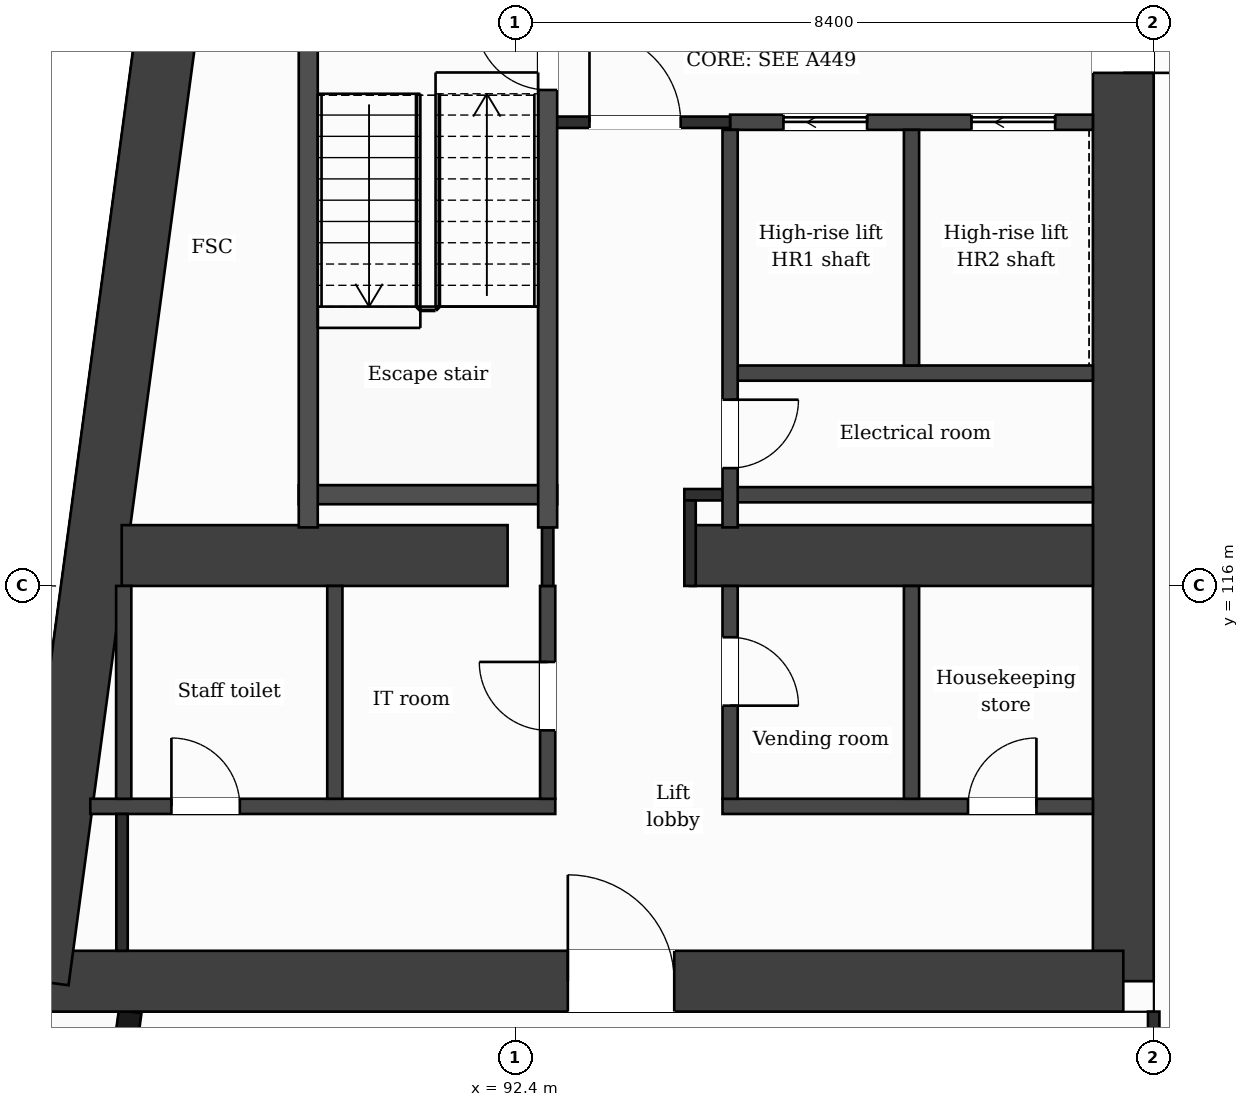
"""IFC4 building model, lengths in metres.
Left out: names, types, materials, properties, quantities, classifications, styles, units other than length and angle.
Written with IfcOpenShell. Run it as: python <this file> out.ifc"""

import sys

from ifc_helpers import new_model, si_unit, direction, frame, frame_2d, origin, place, context, subcontext, project, spatial, rectangle, extrude, element, fill, save


model = new_model("IFC4")
c1 = context("Model", 3, precision=1e-05, world=origin(), true_north=direction((0.0, 1.0)))
c2 = subcontext(c1, "Body", "Model", "MODEL_VIEW")
j1 = project(units=[si_unit("LENGTHUNIT", "METRE"), si_unit("PLANEANGLEUNIT", "RADIAN")], contexts=[c1])
p1 = place(None, origin())
s1 = spatial("IfcSite", under=j1, at=p1, CompositionType="ELEMENT")
p2 = place(p1, origin())
s2 = spatial("IfcBuilding", under=s1, at=p2, CompositionType="ELEMENT")
p3 = place(p2, frame((0.0, 0.0, 202.2)))
s3 = spatial("IfcBuildingStorey", under=s2, at=p3, CompositionType="ELEMENT", Elevation=202.2)
p4 = place(p3, frame((100.4, 132.0, 0.0), z_axis=(0.0, 0.0, 1.0), x_axis=(0.0, -1.0, 0.0)))
e1 = element("IfcWall", 1, at=p4, inside=s3, PredefinedType="SHEAR", context=c2, shape_type="SweptSolid", body=[
    extrude(rectangle(XDim=21.2, YDim=0.8, at=frame_2d((10.6, 0.0))), origin(), (0.0, 0.0, 1.0), 3.7),
])
p5 = place(p4, frame((7.85, 0.0, 0.0)))
e2 = element("IfcOpeningElement", 2, at=p5, cuts=e1, PredefinedType="OPENING", context=c2, shape_type="SweptSolid", body=[
    extrude(rectangle(XDim=1.4, YDim=2.1, at=frame_2d((0.7, 1.05))), frame((0.0, 0.41, 0.0), z_axis=(0.0, -1.0, 0.0), x_axis=(1.0, 0.0, 0.0)), (0.0, 0.0, 1.0), 0.82),
])
p6 = place(p3, frame((100.4, 110.8, 0.0), z_axis=(0.0, 0.0, 1.0), x_axis=(-1.0, 0.0, 0.0)))
e3 = element("IfcWall", 3, at=p6, inside=s3, PredefinedType="SHEAR", context=c2, shape_type="SweptSolid", body=[
    extrude(rectangle(XDim=14.273, YDim=0.8, at=frame_2d((7.137, 0.0))), origin(), (0.0, 0.0, 1.0), 3.7),
])
p7 = place(p6, frame((5.908, 0.0, 0.0)))
e4 = element("IfcOpeningElement", 4, at=p7, cuts=e3, PredefinedType="OPENING", context=c2, shape_type="SweptSolid", body=[
    extrude(rectangle(XDim=1.4, YDim=2.1, at=frame_2d((0.7, 1.05))), frame((0.0, 0.41, 0.0), z_axis=(0.0, -1.0, 0.0), x_axis=(1.0, 0.0, 0.0)), (0.0, 0.0, 1.0), 0.82),
])
p8 = place(p3, frame((86.127, 110.8, 0.0), z_axis=(0.0, 0.0, 1.0), x_axis=(0.133408347329, 0.991061154956, 0.0)))
e5 = element("IfcWall", 5, at=p8, inside=s3, PredefinedType="SHEAR", context=c2, shape_type="SweptSolid", body=[
    extrude(rectangle(XDim=21.391, YDim=0.8, at=frame_2d((10.696, 0.0))), origin(), (0.0, 0.0, 1.0), 3.7),
])
p9 = place(p3, frame((87.223, 116.4, 0.0), z_axis=(0.0, 0.0, 1.0), x_axis=(1.0, 0.0, 0.0)))
e6 = element("IfcWall", 6, at=p9, inside=s3, PredefinedType="SHEAR", context=c2, shape_type="SweptSolid", body=[
    extrude(rectangle(XDim=5.077, YDim=0.8, at=frame_2d((2.539, 0.0))), origin(), (0.0, 0.0, 1.0), 3.7),
])
p10 = place(p3, frame((94.7, 116.4, 0.0), z_axis=(0.0, 0.0, 1.0), x_axis=(1.0, 0.0, 0.0)))
e7 = element("IfcWall", 7, at=p10, inside=s3, PredefinedType="SHEAR", context=c2, shape_type="SweptSolid", body=[
    extrude(rectangle(XDim=5.3, YDim=0.8, at=frame_2d((2.65, 0.0))), origin(), (0.0, 0.0, 1.0), 3.7),
])
p11 = place(p3, frame((87.334, 110.4, 0.0), z_axis=(0.0, 0.0, 1.0), x_axis=(-0.133437175554, -0.991057273915, 0.0)))
e8 = element("IfcWall", 8, at=p11, inside=s3, PredefinedType="SOLIDWALL", context=c2, shape_type="SweptSolid", body=[
    extrude(rectangle(XDim=6.781, YDim=0.3, at=frame_2d((3.39, 0.0))), origin(), (0.0, 0.0, 1.0), 3.38),
])
p12 = place(p11, frame((1.418, 0.0, 0.0)))
e9 = element("IfcOpeningElement", 9, at=p12, cuts=e8, PredefinedType="OPENING", context=c2, shape_type="SweptSolid", body=[
    extrude(rectangle(XDim=1.2, YDim=2.4, at=frame_2d((0.6, 1.2))), frame((0.0, 0.16, 0.0), z_axis=(0.0, -1.0, 0.0), x_axis=(1.0, 0.0, 0.0)), (0.0, 0.0, 1.0), 0.32),
])
p13 = place(p11, frame((4.758, 0.0, 0.9)))
e10 = element("IfcOpeningElement", 10, at=p13, cuts=e8, PredefinedType="OPENING", context=c2, shape_type="SweptSolid", body=[
    extrude(rectangle(XDim=1.2, YDim=2.1, at=frame_2d((0.6, 1.05))), frame((0.0, 0.16, 0.0), z_axis=(0.0, -1.0, 0.0), x_axis=(1.0, 0.0, 0.0)), (0.0, 0.0, 1.0), 0.32),
])
p14 = place(p3, frame((86.81, 113.1, 0.0), z_axis=(0.0, 0.0, 1.0), x_axis=(1.0, 0.0, 0.0)))
e11 = element("IfcWall", 11, at=p14, inside=s3, PredefinedType="PARTITIONING", context=c2, shape_type="SweptSolid", body=[
    extrude(rectangle(XDim=6.117, YDim=0.2, at=frame_2d((3.059, 0.0))), origin(), (0.0, 0.0, 1.0), 3.38),
])
p15 = place(p14, frame((1.067, 0.0, 0.0)))
e12 = element("IfcOpeningElement", 12, at=p15, cuts=e11, PredefinedType="OPENING", context=c2, shape_type="SweptSolid", body=[
    extrude(rectangle(XDim=0.9, YDim=2.1, at=frame_2d((0.45, 1.05))), frame((0.0, 0.11, 0.0), z_axis=(0.0, -1.0, 0.0), x_axis=(1.0, 0.0, 0.0)), (0.0, 0.0, 1.0), 0.22),
])
p16 = place(p3, frame((95.127, 113.1, 0.0), z_axis=(0.0, 0.0, 1.0), x_axis=(1.0, 0.0, 0.0)))
e13 = element("IfcWall", 13, at=p16, inside=s3, PredefinedType="PARTITIONING", context=c2, shape_type="SweptSolid", body=[
    extrude(rectangle(XDim=4.873, YDim=0.2, at=frame_2d((2.437, 0.0))), origin(), (0.0, 0.0, 1.0), 3.38),
])
p17 = place(p16, frame((3.23, 0.0, 0.0)))
e14 = element("IfcOpeningElement", 14, at=p17, cuts=e13, PredefinedType="OPENING", context=c2, shape_type="SweptSolid", body=[
    extrude(rectangle(XDim=0.9, YDim=2.1, at=frame_2d((0.45, 1.05))), frame((0.0, 0.11, 0.0), z_axis=(0.0, -1.0, 0.0), x_axis=(1.0, 0.0, 0.0)), (0.0, 0.0, 1.0), 0.22),
])
p18 = place(p3, frame((95.227, 117.2, 0.0), z_axis=(0.0, 0.0, 1.0), x_axis=(1.0, 0.0, 0.0)))
e15 = element("IfcWall", 15, at=p18, inside=s3, PredefinedType="PARTITIONING", context=c2, shape_type="SweptSolid", body=[
    extrude(rectangle(XDim=4.773, YDim=0.2, at=frame_2d((2.386, 0.0))), origin(), (0.0, 0.0, 1.0), 3.38),
])
p19 = place(p3, frame((94.625, 117.2, 0.0), z_axis=(0.0, 0.0, 1.0), x_axis=(1.0, 0.0, 0.0)))
e16 = element("IfcWall", 16, at=p19, inside=s3, PredefinedType="PARTITIONING", context=c2, shape_type="SweptSolid", body=[
    extrude(rectangle(XDim=0.602, YDim=0.15, at=frame_2d((0.301, 0.0))), origin(), (0.0, 0.0, 1.0), 3.38),
])
p20 = place(p3, frame((89.552, 117.2, 0.0), z_axis=(0.0, 0.0, 1.0), x_axis=(1.0, 0.0, 0.0)))
e17 = element("IfcWall", 17, at=p20, inside=s3, PredefinedType="PARTITIONING", context=c2, shape_type="SweptSolid", body=[
    extrude(rectangle(XDim=3.4, YDim=0.25, at=frame_2d((1.7, 0.0))), origin(), (0.0, 0.0, 1.0), 3.38),
])
p21 = place(p3, frame((95.227, 118.8, 0.0), z_axis=(0.0, 0.0, 1.0), x_axis=(1.0, 0.0, 0.0)))
e18 = element("IfcWall", 18, at=p21, inside=s3, PredefinedType="PARTITIONING", context=c2, shape_type="SweptSolid", body=[
    extrude(rectangle(XDim=4.773, YDim=0.2, at=frame_2d((2.386, 0.0))), origin(), (0.0, 0.0, 1.0), 3.38),
])
p22 = place(p3, frame((95.227, 122.1, 0.0), z_axis=(0.0, 0.0, 1.0), x_axis=(1.0, 0.0, 0.0)))
e19 = element("IfcWall", 19, at=p22, inside=s3, PredefinedType="PARTITIONING", context=c2, shape_type="SweptSolid", body=[
    extrude(rectangle(XDim=4.773, YDim=0.2, at=frame_2d((2.386, 0.0))), origin(), (0.0, 0.0, 1.0), 3.38),
])
p23 = place(p22, frame((0.702, 0.0, 0.0)))
e20 = element("IfcOpeningElement", 20, at=p23, cuts=e19, PredefinedType="OPENING", context=c2, shape_type="SweptSolid", body=[
    extrude(rectangle(XDim=1.1, YDim=2.1, at=frame_2d((0.55, 1.05))), frame((0.0, 0.11, 0.0), z_axis=(0.0, -1.0, 0.0), x_axis=(1.0, 0.0, 0.0)), (0.0, 0.0, 1.0), 0.22),
])
p24 = place(p22, frame((3.176, 0.0, 0.0)))
e21 = element("IfcOpeningElement", 21, at=p24, cuts=e19, PredefinedType="OPENING", context=c2, shape_type="SweptSolid", body=[
    extrude(rectangle(XDim=1.1, YDim=2.1, at=frame_2d((0.55, 1.05))), frame((0.0, 0.11, 0.0), z_axis=(0.0, -1.0, 0.0), x_axis=(1.0, 0.0, 0.0)), (0.0, 0.0, 1.0), 0.22),
])
p25 = place(p3, frame((92.827, 122.1, 0.0), z_axis=(0.0, 0.0, 1.0), x_axis=(1.0, 0.0, 0.0)))
e22 = element("IfcWall", 22, at=p25, inside=s3, PredefinedType="PARTITIONING", context=c2, shape_type="SweptSolid", body=[
    extrude(rectangle(XDim=2.4, YDim=0.15, at=frame_2d((1.2, 0.0))), origin(), (0.0, 0.0, 1.0), 3.38),
])
p26 = place(p25, frame((0.55, 0.0, 0.0)))
e23 = element("IfcOpeningElement", 23, at=p26, cuts=e22, PredefinedType="OPENING", context=c2, shape_type="SweptSolid", body=[
    extrude(rectangle(XDim=1.2, YDim=2.1, at=frame_2d((0.6, 1.05))), frame((0.0, 0.085, 0.0), z_axis=(0.0, -1.0, 0.0), x_axis=(1.0, 0.0, 0.0)), (0.0, 0.0, 1.0), 0.17),
])
p27 = place(p3, frame((87.25, 113.2, 0.0), z_axis=(0.0, 0.0, 1.0), x_axis=(0.0, 1.0, 0.0)))
e24 = element("IfcWall", 24, at=p27, inside=s3, PredefinedType="PARTITIONING", context=c2, shape_type="SweptSolid", body=[
    extrude(rectangle(XDim=2.8, YDim=0.2, at=frame_2d((1.4, 0.0))), origin(), (0.0, 0.0, 1.0), 3.38),
])
p28 = place(p3, frame((87.227, 111.2, 0.0), z_axis=(0.0, 0.0, 1.0), x_axis=(0.0, 1.0, 0.0)))
e25 = element("IfcWall", 25, at=p28, inside=s3, PredefinedType="PARTITIONING", context=c2, shape_type="SweptSolid", body=[
    extrude(rectangle(XDim=1.8, YDim=0.15, at=frame_2d((0.9, 0.0))), origin(), (0.0, 0.0, 1.0), 3.38),
])
p29 = place(p3, frame((89.677, 116.77, 0.0), z_axis=(0.0, 0.0, 1.0), x_axis=(0.0, 1.0, 0.0)))
e26 = element("IfcWall", 26, at=p29, inside=s3, PredefinedType="PARTITIONING", context=c2, shape_type="SweptSolid", body=[
    extrude(rectangle(XDim=7.055, YDim=0.25, at=frame_2d((3.527, 0.0))), origin(), (0.0, 0.0, 1.0), 3.38),
])
p30 = place(p3, frame((90.027, 113.2, 0.0), z_axis=(0.0, 0.0, 1.0), x_axis=(0.0, 1.0, 0.0)))
e27 = element("IfcWall", 27, at=p30, inside=s3, PredefinedType="PARTITIONING", context=c2, shape_type="SweptSolid", body=[
    extrude(rectangle(XDim=2.8, YDim=0.2, at=frame_2d((1.4, 0.0))), origin(), (0.0, 0.0, 1.0), 3.38),
])
p31 = place(p3, frame((92.827, 113.2, 0.0), z_axis=(0.0, 0.0, 1.0), x_axis=(0.0, 1.0, 0.0)))
e28 = element("IfcWall", 28, at=p31, inside=s3, PredefinedType="PARTITIONING", context=c2, shape_type="SweptSolid", body=[
    extrude(rectangle(XDim=2.8, YDim=0.2, at=frame_2d((1.4, 0.0))), origin(), (0.0, 0.0, 1.0), 3.38),
])
p32 = place(p31, frame((0.9, 0.0, 0.0)))
e29 = element("IfcOpeningElement", 29, at=p32, cuts=e28, PredefinedType="OPENING", context=c2, shape_type="SweptSolid", body=[
    extrude(rectangle(XDim=0.9, YDim=2.1, at=frame_2d((0.45, 1.05))), frame((0.0, 0.11, 0.0), z_axis=(0.0, -1.0, 0.0), x_axis=(1.0, 0.0, 0.0)), (0.0, 0.0, 1.0), 0.22),
])
p33 = place(p3, frame((92.827, 116.0, 0.0), z_axis=(0.0, 0.0, 1.0), x_axis=(0.0, 1.0, 0.0)))
e30 = element("IfcWall", 30, at=p33, inside=s3, PredefinedType="PARTITIONING", context=c2, shape_type="SweptSolid", body=[
    extrude(rectangle(XDim=0.77, YDim=0.15, at=frame_2d((0.385, 0.0))), origin(), (0.0, 0.0, 1.0), 3.38),
])
p34 = place(p3, frame((92.827, 116.77, 0.0), z_axis=(0.0, 0.0, 1.0), x_axis=(0.0, 1.0, 0.0)))
e31 = element("IfcWall", 31, at=p34, inside=s3, PredefinedType="PARTITIONING", context=c2, shape_type="SweptSolid", body=[
    extrude(rectangle(XDim=7.055, YDim=0.25, at=frame_2d((3.527, 0.0))), origin(), (0.0, 0.0, 1.0), 3.38),
])
p35 = place(p34, frame((5.755, 0.0, 0.0)))
e32 = element("IfcOpeningElement", 32, at=p35, cuts=e31, PredefinedType="OPENING", context=c2, shape_type="SweptSolid", body=[
    extrude(rectangle(XDim=0.95, YDim=2.1, at=frame_2d((0.475, 1.05))), frame((0.0, 0.135, 0.0), z_axis=(0.0, -1.0, 0.0), x_axis=(1.0, 0.0, 0.0)), (0.0, 0.0, 1.0), 0.27),
])
p36 = place(p3, frame((94.7, 116.0, 0.0), z_axis=(0.0, 0.0, 1.0), x_axis=(0.0, 1.0, 0.0)))
e33 = element("IfcWall", 33, at=p36, inside=s3, PredefinedType="PARTITIONING", context=c2, shape_type="SweptSolid", body=[
    extrude(rectangle(XDim=1.125, YDim=0.15, at=frame_2d((0.562, 0.0))), origin(), (0.0, 0.0, 1.0), 3.38),
])
p37 = place(p3, frame((95.227, 113.2, 0.0), z_axis=(0.0, 0.0, 1.0), x_axis=(0.0, 1.0, 0.0)))
e34 = element("IfcWall", 34, at=p37, inside=s3, PredefinedType="PARTITIONING", context=c2, shape_type="SweptSolid", body=[
    extrude(rectangle(XDim=2.8, YDim=0.2, at=frame_2d((1.4, 0.0))), origin(), (0.0, 0.0, 1.0), 3.38),
])
p38 = place(p37, frame((1.225, 0.0, 0.0)))
e35 = element("IfcOpeningElement", 35, at=p38, cuts=e34, PredefinedType="OPENING", context=c2, shape_type="SweptSolid", body=[
    extrude(rectangle(XDim=0.9, YDim=2.1, at=frame_2d((0.45, 1.05))), frame((0.0, 0.11, 0.0), z_axis=(0.0, -1.0, 0.0), x_axis=(1.0, 0.0, 0.0)), (0.0, 0.0, 1.0), 0.22),
])
p39 = place(p3, frame((95.227, 116.77, 0.0), z_axis=(0.0, 0.0, 1.0), x_axis=(0.0, 1.0, 0.0)))
e36 = element("IfcWall", 36, at=p39, inside=s3, PredefinedType="PARTITIONING", context=c2, shape_type="SweptSolid", body=[
    extrude(rectangle(XDim=5.23, YDim=0.2, at=frame_2d((2.615, 0.0))), origin(), (0.0, 0.0, 1.0), 3.38),
])
p40 = place(p39, frame((0.78, 0.0, 0.0)))
e37 = element("IfcOpeningElement", 37, at=p40, cuts=e36, PredefinedType="OPENING", context=c2, shape_type="SweptSolid", body=[
    extrude(rectangle(XDim=0.9, YDim=2.1, at=frame_2d((0.45, 1.05))), frame((0.0, 0.11, 0.0), z_axis=(0.0, -1.0, 0.0), x_axis=(1.0, 0.0, 0.0)), (0.0, 0.0, 1.0), 0.22),
])
p41 = place(p3, frame((97.614, 113.2, 0.0), z_axis=(0.0, 0.0, 1.0), x_axis=(0.0, 1.0, 0.0)))
e38 = element("IfcWall", 38, at=p41, inside=s3, PredefinedType="PARTITIONING", context=c2, shape_type="SweptSolid", body=[
    extrude(rectangle(XDim=2.8, YDim=0.2, at=frame_2d((1.4, 0.0))), origin(), (0.0, 0.0, 1.0), 3.38),
])
p42 = place(p3, frame((97.614, 118.9, 0.0), z_axis=(0.0, 0.0, 1.0), x_axis=(0.0, 1.0, 0.0)))
e39 = element("IfcWall", 39, at=p42, inside=s3, PredefinedType="PARTITIONING", context=c2, shape_type="SweptSolid", body=[
    extrude(rectangle(XDim=3.1, YDim=0.2, at=frame_2d((1.55, 0.0))), origin(), (0.0, 0.0, 1.0), 3.38),
])
p43 = place(p3, frame((100.8, 109.075, 0.0), z_axis=(0.0, 0.0, 1.0), x_axis=(0.0, 1.0, 0.0)))
e40 = element("IfcWall", 40, at=p43, inside=s3, PredefinedType="PARTITIONING", context=c2, shape_type="SweptSolid", body=[
    extrude(rectangle(XDim=1.325, YDim=0.15, at=frame_2d((0.663, 0.0))), origin(), (0.0, 0.0, 1.0), 3.38),
])
p44 = place(p26, origin())
e41 = element("IfcDoor", 41, at=p44, inside=s3, OperationType="SINGLE_SWING_LEFT", PredefinedType="DOOR", context=c2, shape_type="SweptSolid", body=[
    extrude(rectangle(XDim=1.2, YDim=2.1, at=frame_2d((0.6, 1.05))), frame((0.0, 0.025, 0.0), z_axis=(0.0, -1.0, 0.0), x_axis=(1.0, 0.0, 0.0)), (0.0, 0.0, 1.0), 0.05),
])
fill(e23, e41)
p45 = place(p23, origin())
e42 = element("IfcDoor", 42, at=p45, inside=s3, OperationType="SLIDING_TO_LEFT", PredefinedType="DOOR", context=c2, shape_type="SweptSolid", body=[
    extrude(rectangle(XDim=1.1, YDim=2.1, at=frame_2d((0.55, 1.05))), frame((0.0, 0.025, 0.0), z_axis=(0.0, -1.0, 0.0), x_axis=(1.0, 0.0, 0.0)), (0.0, 0.0, 1.0), 0.05),
])
fill(e20, e42)
p46 = place(p24, origin())
e43 = element("IfcDoor", 43, at=p46, inside=s3, OperationType="SLIDING_TO_LEFT", PredefinedType="DOOR", context=c2, shape_type="SweptSolid", body=[
    extrude(rectangle(XDim=1.1, YDim=2.1, at=frame_2d((0.55, 1.05))), frame((0.0, 0.025, 0.0), z_axis=(0.0, -1.0, 0.0), x_axis=(1.0, 0.0, 0.0)), (0.0, 0.0, 1.0), 0.05),
])
fill(e21, e43)
p47 = place(p35, origin())
e44 = element("IfcDoor", 44, at=p47, inside=s3, OperationType="SINGLE_SWING_RIGHT", PredefinedType="DOOR", context=c2, shape_type="SweptSolid", body=[
    extrude(rectangle(XDim=0.95, YDim=2.1, at=frame_2d((0.475, 1.05))), frame((0.0, 0.025, 0.0), z_axis=(0.0, -1.0, 0.0), x_axis=(1.0, 0.0, 0.0)), (0.0, 0.0, 1.0), 0.05),
])
fill(e32, e44)
p48 = place(p40, origin())
e45 = element("IfcDoor", 45, at=p48, inside=s3, OperationType="SINGLE_SWING_RIGHT", PredefinedType="DOOR", context=c2, shape_type="SweptSolid", body=[
    extrude(rectangle(XDim=0.9, YDim=2.1, at=frame_2d((0.45, 1.05))), frame((0.0, 0.025, 0.0), z_axis=(0.0, -1.0, 0.0), x_axis=(1.0, 0.0, 0.0)), (0.0, 0.0, 1.0), 0.05),
])
fill(e37, e45)
p49 = place(p15, origin())
e46 = element("IfcDoor", 46, at=p49, inside=s3, OperationType="SINGLE_SWING_LEFT", PredefinedType="DOOR", context=c2, shape_type="SweptSolid", body=[
    extrude(rectangle(XDim=0.9, YDim=2.1, at=frame_2d((0.45, 1.05))), frame((0.0, 0.025, 0.0), z_axis=(0.0, -1.0, 0.0), x_axis=(1.0, 0.0, 0.0)), (0.0, 0.0, 1.0), 0.05),
])
fill(e12, e46)
p50 = place(p32, origin())
e47 = element("IfcDoor", 47, at=p50, inside=s3, OperationType="SINGLE_SWING_RIGHT", PredefinedType="DOOR", context=c2, shape_type="SweptSolid", body=[
    extrude(rectangle(XDim=0.9, YDim=2.1, at=frame_2d((0.45, 1.05))), frame((0.0, 0.025, 0.0), z_axis=(0.0, -1.0, 0.0), x_axis=(1.0, 0.0, 0.0)), (0.0, 0.0, 1.0), 0.05),
])
fill(e29, e47)
p51 = place(p38, origin())
e48 = element("IfcDoor", 48, at=p51, inside=s3, OperationType="SINGLE_SWING_LEFT", PredefinedType="DOOR", context=c2, shape_type="SweptSolid", body=[
    extrude(rectangle(XDim=0.9, YDim=2.1, at=frame_2d((0.45, 1.05))), frame((0.0, 0.025, 0.0), z_axis=(0.0, -1.0, 0.0), x_axis=(1.0, 0.0, 0.0)), (0.0, 0.0, 1.0), 0.05),
])
fill(e35, e48)
p52 = place(p17, origin())
e49 = element("IfcDoor", 49, at=p52, inside=s3, OperationType="SINGLE_SWING_RIGHT", PredefinedType="DOOR", context=c2, shape_type="SweptSolid", body=[
    extrude(rectangle(XDim=0.9, YDim=2.1, at=frame_2d((0.45, 1.05))), frame((0.0, 0.025, 0.0), z_axis=(0.0, -1.0, 0.0), x_axis=(1.0, 0.0, 0.0)), (0.0, 0.0, 1.0), 0.05),
])
fill(e14, e49)
p53 = place(p7, origin())
e50 = element("IfcDoor", 50, at=p53, inside=s3, OperationType="SINGLE_SWING_RIGHT", PredefinedType="DOOR", context=c2, shape_type="SweptSolid", body=[
    extrude(rectangle(XDim=1.4, YDim=2.1, at=frame_2d((0.7, 1.05))), frame((0.0, 0.025, 0.0), z_axis=(0.0, -1.0, 0.0), x_axis=(1.0, 0.0, 0.0)), (0.0, 0.0, 1.0), 0.05),
])
fill(e4, e50)
p54 = place(p5, origin())
e51 = element("IfcDoor", 51, at=p54, inside=s3, OperationType="SINGLE_SWING_RIGHT", PredefinedType="DOOR", context=c2, shape_type="SweptSolid", body=[
    extrude(rectangle(XDim=1.4, YDim=2.1, at=frame_2d((0.7, 1.05))), frame((0.0, 0.025, 0.0), z_axis=(0.0, -1.0, 0.0), x_axis=(1.0, 0.0, 0.0)), (0.0, 0.0, 1.0), 0.05),
])
fill(e2, e51)
save(model, sys.argv[1])
